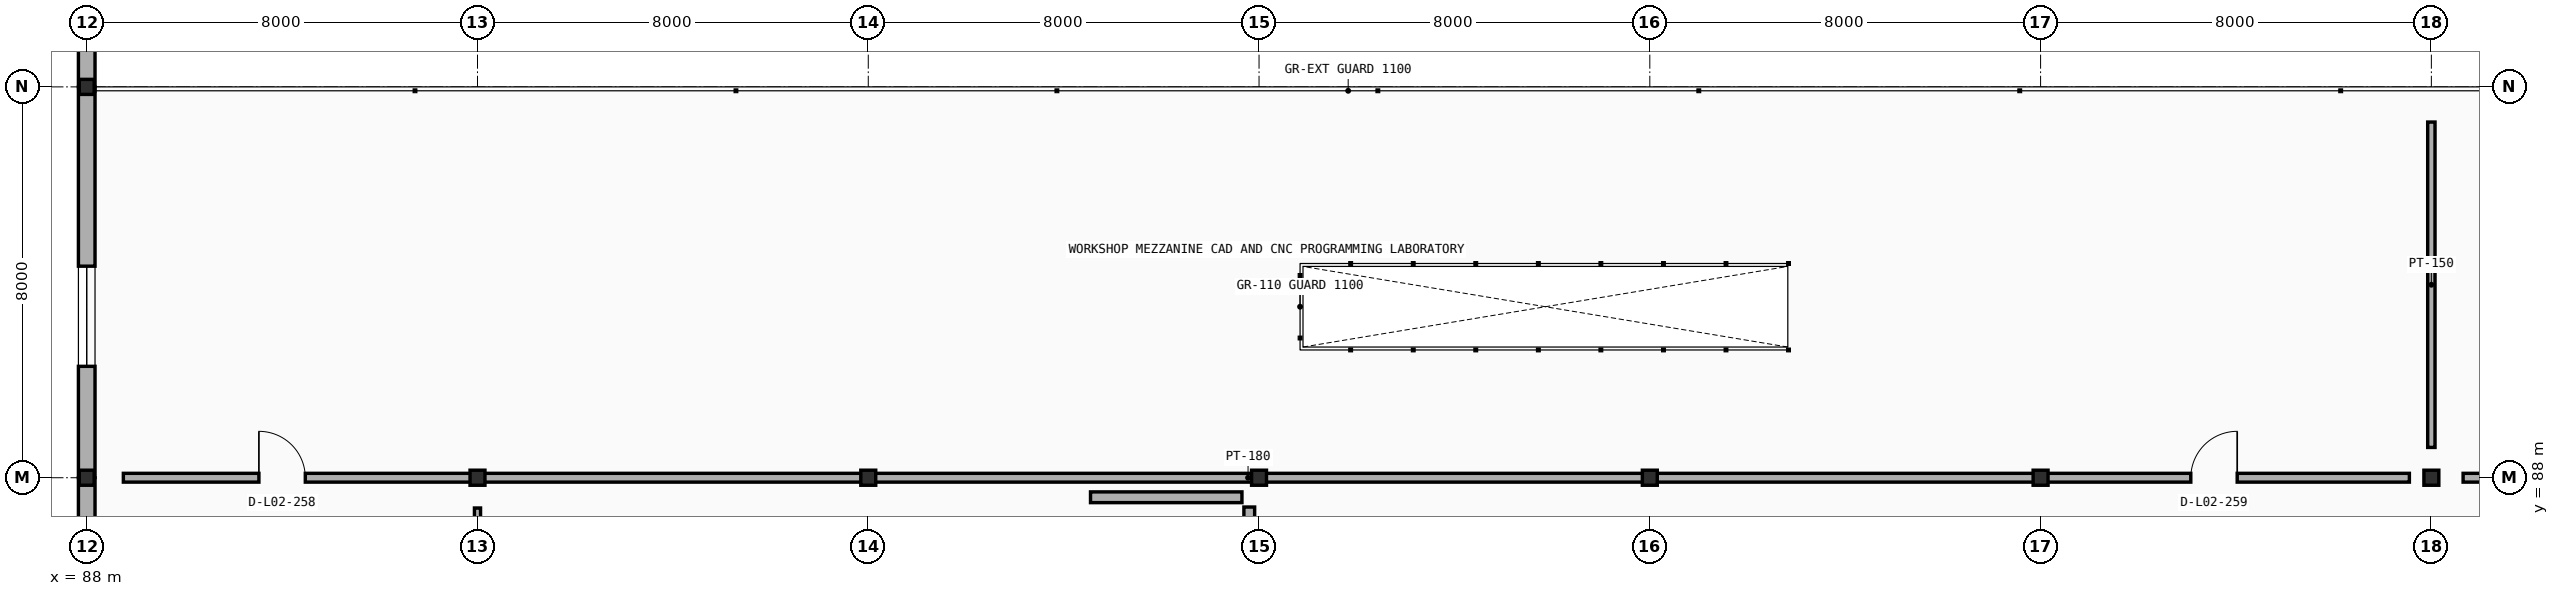
"""IFC4 building model, lengths in metres.
Left out: names, types, materials, properties, quantities, classifications, styles, units other than length and angle.
Written with IfcOpenShell. Run it as: python <this file> out.ifc"""

import sys

from ifc_helpers import new_model, si_unit, direction, frame, frame_2d, origin, origin_2d, place, context, subcontext, project, spatial, rectangle, i_section, extrude, element, fill, save


model = new_model("IFC4")
c1 = context("Model", 3, precision=1e-05, world=origin(), true_north=direction((0.0, 1.0)))
c2 = subcontext(c1, "Body", "Model", "MODEL_VIEW")
j1 = project(units=[si_unit("LENGTHUNIT", "METRE"), si_unit("PLANEANGLEUNIT", "RADIAN")], contexts=[c1])
p1 = place(None, origin())
s1 = spatial("IfcSite", under=j1, at=p1, CompositionType="ELEMENT")
p2 = place(p1, origin())
s2 = spatial("IfcBuilding", under=s1, at=p2, CompositionType="ELEMENT")
p3 = place(p2, frame((0.0, 0.0, 4.8)))
s3 = spatial("IfcBuildingStorey", under=s2, at=p3, CompositionType="ELEMENT", Elevation=4.8)
for number, where, z_axis, x_axis in (
    (1, (88.0, 88.0, 0.0), (0.0, 0.0, 1.0), (1.0, 0.0, 0.0)),
    (2, (96.0, 88.0, 0.0), (0.0, 0.0, 1.0), (1.0, 0.0, 0.0)),
    (3, (104.0, 88.0, 0.0), (0.0, 0.0, 1.0), (1.0, 0.0, 0.0)),
    (4, (112.0, 88.0, 0.0), (0.0, 0.0, 1.0), (1.0, 0.0, 0.0)),
    (5, (120.0, 88.0, 0.0), (0.0, 0.0, 1.0), (1.0, 0.0, 0.0)),
    (6, (128.0, 88.0, 0.0), (0.0, 0.0, 1.0), (1.0, 0.0, 0.0)),
    (7, (136.0, 88.0, 0.0), (0.0, 0.0, 1.0), (1.0, 0.0, 0.0)),
    (8, (88.0, 96.0, 0.0), (0.0, 0.0, 1.0), (1.0, 0.0, 0.0)),
):
    element("IfcColumn", number, at=place(p3, frame(where, z_axis=z_axis, x_axis=x_axis)), inside=s3, PredefinedType="COLUMN", context=c2, shape_type="SweptSolid", body=[
        extrude(i_section(OverallWidth=0.305, OverallDepth=0.308, WebThickness=0.01, FlangeThickness=0.015, FilletRadius=0.015, at=origin_2d()), origin(), (0.0, 0.0, 1.0), 5.15),
    ])
p4 = place(p3, frame((88.0, 80.004, 0.0), z_axis=(0.0, 0.0, 1.0), x_axis=(0.0, 1.0, 0.0)))
e9 = element("IfcWall", 9, at=p4, inside=s3, PredefinedType="STANDARD", context=c2, shape_type="SweptSolid", body=[
    extrude(rectangle(XDim=7.992, YDim=0.34, at=frame_2d((3.996, 0.0))), origin(), (0.0, 0.0, 1.0), 3.815),
])
p5 = place(p4, frame((2.276, 0.0, 1.2)))
e10 = element("IfcOpeningElement", 10, at=p5, cuts=e9, PredefinedType="OPENING", context=c2, shape_type="SweptSolid", body=[
    extrude(rectangle(XDim=2.05, YDim=2.0, at=frame_2d((1.025, 1.0))), frame((0.0, 0.18, 0.0), z_axis=(0.0, -1.0, 0.0), x_axis=(1.0, 0.0, 0.0)), (0.0, 0.0, 1.0), 0.36),
])
p6 = place(p3, frame((88.0, 88.004, 0.0), z_axis=(0.0, 0.0, 1.0), x_axis=(0.0, 1.0, 0.0)))
e11 = element("IfcWall", 11, at=p6, inside=s3, PredefinedType="STANDARD", context=c2, shape_type="SweptSolid", body=[
    extrude(rectangle(XDim=7.992, YDim=0.34, at=frame_2d((3.996, 0.0))), origin(), (0.0, 0.0, 1.0), 4.92),
])
p7 = place(p6, frame((2.276, 0.0, 1.2)))
e12 = element("IfcOpeningElement", 12, at=p7, cuts=e11, PredefinedType="OPENING", context=c2, shape_type="SweptSolid", body=[
    extrude(rectangle(XDim=2.05, YDim=2.0, at=frame_2d((1.025, 1.0))), frame((0.0, 0.18, 0.0), z_axis=(0.0, -1.0, 0.0), x_axis=(1.0, 0.0, 0.0)), (0.0, 0.0, 1.0), 0.36),
])
p8 = place(p3, frame((88.0, 96.004, 0.0), z_axis=(0.0, 0.0, 1.0), x_axis=(0.0, 1.0, 0.0)))
e13 = element("IfcWall", 13, at=p8, inside=s3, PredefinedType="STANDARD", context=c2, shape_type="SweptSolid", body=[
    extrude(rectangle(XDim=7.992, YDim=0.34, at=frame_2d((3.996, 0.0))), origin(), (0.0, 0.0, 1.0), 4.92),
])
p9 = place(p8, frame((2.276, 0.0, 1.2)))
e14 = element("IfcOpeningElement", 14, at=p9, cuts=e13, PredefinedType="OPENING", context=c2, shape_type="SweptSolid", body=[
    extrude(rectangle(XDim=2.05, YDim=2.0, at=frame_2d((1.025, 1.0))), frame((0.0, 0.18, 0.0), z_axis=(0.0, -1.0, 0.0), x_axis=(1.0, 0.0, 0.0)), (0.0, 0.0, 1.0), 0.36),
])
p10 = place(p3, frame((87.78, 87.9, 0.0), z_axis=(0.0, 0.0, 1.0), x_axis=(-1.0, 0.0, 0.0)))
e15 = element("IfcWall", 15, at=p10, inside=s3, PredefinedType="PARAPET", context=c2, shape_type="SweptSolid", body=[
    extrude(rectangle(XDim=39.56, YDim=0.2, at=frame_2d((19.78, 0.0))), origin(), (0.0, 0.0, 1.0), 1.15),
])
p11 = place(p3, frame((108.55, 87.6, 0.0), z_axis=(0.0, 0.0, 1.0), x_axis=(1.0, 0.0, 0.0)))
e16 = element("IfcWall", 16, at=p11, inside=s3, PredefinedType="PARTITIONING", context=c2, shape_type="SweptSolid", body=[
    extrude(rectangle(XDim=3.1, YDim=0.22, at=frame_2d((1.55, 0.0))), origin(), (0.0, 0.0, 1.0), 3.887),
])
p12 = place(p3, frame((111.8, 81.2, 0.0), z_axis=(0.0, 0.0, 1.0), x_axis=(0.0, 1.0, 0.0)))
e17 = element("IfcWall", 17, at=p12, inside=s3, PredefinedType="PARTITIONING", context=c2, shape_type="SweptSolid", body=[
    extrude(rectangle(XDim=6.2, YDim=0.22, at=frame_2d((3.1, 0.0))), origin(), (0.0, 0.0, 1.0), 3.815),
])
p13 = place(p12, frame((3.8, 0.0, 0.0)))
e18 = element("IfcOpeningElement", 18, at=p13, cuts=e17, PredefinedType="OPENING", context=c2, shape_type="SweptSolid", body=[
    extrude(rectangle(XDim=1.5, YDim=2.2, at=frame_2d((0.75, 1.1))), frame((0.0, 0.12, 0.0), z_axis=(0.0, -1.0, 0.0), x_axis=(1.0, 0.0, 0.0)), (0.0, 0.0, 1.0), 0.24),
])
p14 = place(p3, frame((88.75, 88.0, 0.0), z_axis=(0.0, 0.0, 1.0), x_axis=(1.0, 0.0, 0.0)))
e19 = element("IfcWall", 19, at=p14, inside=s3, PredefinedType="PARTITIONING", context=c2, shape_type="SweptSolid", body=[
    extrude(rectangle(XDim=46.8, YDim=0.18, at=frame_2d((23.4, 0.0))), origin(), (0.0, 0.0, 1.0), 2.175),
])
p15 = place(p14, frame((2.775, 0.0, 0.0)))
e20 = element("IfcOpeningElement", 20, at=p15, cuts=e19, PredefinedType="OPENING", context=c2, shape_type="SweptSolid", body=[
    extrude(rectangle(XDim=0.95, YDim=2.1, at=frame_2d((0.475, 1.05))), frame((0.0, 0.1, 0.0), z_axis=(0.0, -1.0, 0.0), x_axis=(1.0, 0.0, 0.0)), (0.0, 0.0, 1.0), 0.2),
])
p16 = place(p14, frame((42.325, 0.0, 0.0)))
e21 = element("IfcOpeningElement", 21, at=p16, cuts=e19, PredefinedType="OPENING", context=c2, shape_type="SweptSolid", body=[
    extrude(rectangle(XDim=0.95, YDim=2.1, at=frame_2d((0.475, 1.05))), frame((0.0, 0.1, 0.0), z_axis=(0.0, -1.0, 0.0), x_axis=(1.0, 0.0, 0.0)), (0.0, 0.0, 1.0), 0.2),
])
p17 = place(p3, frame((136.0, 88.62, 0.0), z_axis=(0.0, 0.0, 1.0), x_axis=(0.0, 1.0, 0.0)))
e22 = element("IfcWall", 22, at=p17, inside=s3, PredefinedType="PARTITIONING", context=c2, shape_type="SweptSolid", body=[
    extrude(rectangle(XDim=6.66, YDim=0.15, at=frame_2d((3.33, 0.0))), origin(), (0.0, 0.0, 1.0), 3.9),
])
p18 = place(p3, frame((136.65, 88.0, 0.0), z_axis=(0.0, 0.0, 1.0), x_axis=(1.0, 0.0, 0.0)))
e23 = element("IfcWall", 23, at=p18, inside=s3, PredefinedType="PARTITIONING", context=c2, shape_type="SweptSolid", body=[
    extrude(rectangle(XDim=46.9, YDim=0.18, at=frame_2d((23.45, 0.0))), origin(), (0.0, 0.0, 1.0), 3.887),
])
p19 = place(p18, frame((2.71, 0.0, 0.0)))
e24 = element("IfcOpeningElement", 24, at=p19, cuts=e23, PredefinedType="OPENING", context=c2, shape_type="SweptSolid", body=[
    extrude(rectangle(XDim=1.28, YDim=2.2, at=frame_2d((0.64, 1.1))), frame((0.0, 0.1, 0.0), z_axis=(0.0, -1.0, 0.0), x_axis=(1.0, 0.0, 0.0)), (0.0, 0.0, 1.0), 0.2),
])
p20 = place(p18, frame((42.26, 0.0, 0.0)))
e25 = element("IfcOpeningElement", 25, at=p20, cuts=e23, PredefinedType="OPENING", context=c2, shape_type="SweptSolid", body=[
    extrude(rectangle(XDim=1.28, YDim=2.2, at=frame_2d((0.64, 1.1))), frame((0.0, 0.1, 0.0), z_axis=(0.0, -1.0, 0.0), x_axis=(1.0, 0.0, 0.0)), (0.0, 0.0, 1.0), 0.2),
])
p21 = place(p3, frame((96.0, 80.62, 0.0), z_axis=(0.0, 0.0, 1.0), x_axis=(0.0, 1.0, 0.0)))
e26 = element("IfcWall", 26, at=p21, inside=s3, PredefinedType="PARTITIONING", context=c2, shape_type="SweptSolid", body=[
    extrude(rectangle(XDim=6.76, YDim=0.125, at=frame_2d((3.38, 0.0))), origin(), (0.0, 0.0, 1.0), 3.815),
])
p22 = place(p7, origin())
e27 = element("IfcWindow", 27, at=p22, inside=s3, PartitioningType="DOUBLE_PANEL_VERTICAL", PredefinedType="WINDOW", context=c2, shape_type="SweptSolid", body=[
    extrude(rectangle(XDim=2.05, YDim=2.0, at=frame_2d((1.025, 1.0))), frame((0.0, 0.03, 0.0), z_axis=(0.0, -1.0, 0.0), x_axis=(1.0, 0.0, 0.0)), (0.0, 0.0, 1.0), 0.06),
])
fill(e12, e27)
p23 = place(p15, origin())
e28 = element("IfcDoor", 28, at=p23, inside=s3, OperationType="SINGLE_SWING_LEFT", PredefinedType="DOOR", context=c2, shape_type="SweptSolid", body=[
    extrude(rectangle(XDim=0.95, YDim=2.1, at=frame_2d((0.475, 1.05))), frame((0.0, 0.025, 0.0), z_axis=(0.0, -1.0, 0.0), x_axis=(1.0, 0.0, 0.0)), (0.0, 0.0, 1.0), 0.05),
])
fill(e20, e28)
p24 = place(p16, origin())
e29 = element("IfcDoor", 29, at=p24, inside=s3, OperationType="SINGLE_SWING_RIGHT", PredefinedType="DOOR", context=c2, shape_type="SweptSolid", body=[
    extrude(rectangle(XDim=0.95, YDim=2.1, at=frame_2d((0.475, 1.05))), frame((0.0, 0.025, 0.0), z_axis=(0.0, -1.0, 0.0), x_axis=(1.0, 0.0, 0.0)), (0.0, 0.0, 1.0), 0.05),
])
fill(e21, e29)
save(model, sys.argv[1])
